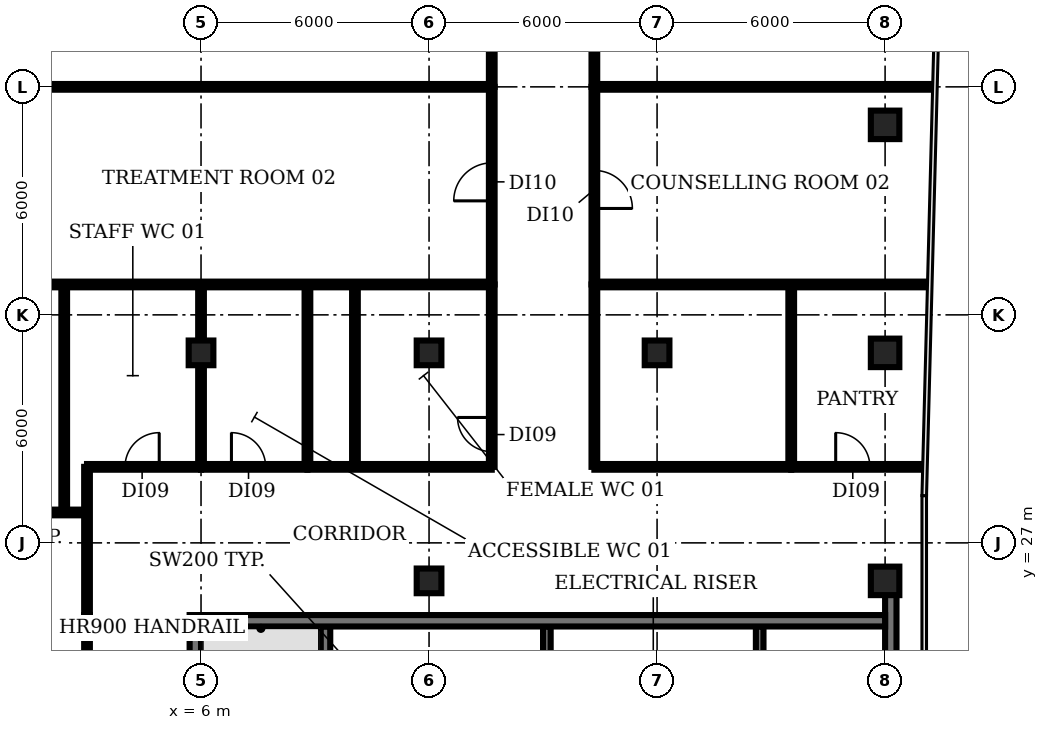
"""IFC4 building model, lengths in metres.
Left out: names, types, materials, properties, quantities, classifications, styles, units other than length and angle.
Written with IfcOpenShell. Run it as: python <this file> out.ifc"""

import sys

from ifc_helpers import new_model, si_unit, direction, frame, frame_2d, origin, origin_2d, place, context, subcontext, project, spatial, rectangle, extrude, element, fill, save


model = new_model("IFC4")
c1 = context("Model", 3, precision=1e-05, world=origin(), true_north=direction((0.0, 1.0)))
c2 = subcontext(c1, "Body", "Model", "MODEL_VIEW")
j1 = project(units=[si_unit("LENGTHUNIT", "METRE"), si_unit("PLANEANGLEUNIT", "RADIAN")], contexts=[c1])
p1 = place(None, origin())
s1 = spatial("IfcSite", under=j1, at=p1, CompositionType="ELEMENT")
p2 = place(p1, origin())
s2 = spatial("IfcBuilding", under=s1, at=p2, CompositionType="ELEMENT")
p3 = place(p2, frame((0.0, 0.0, 281.0)))
s3 = spatial("IfcBuildingStorey", under=s2, at=p3, CompositionType="ELEMENT", Elevation=281.0)
for number, where, z_axis, x_axis in (
    (1, (6.0, 32.0, 0.0), (0.0, 0.0, 1.0), (1.0, 0.0, 0.0)),
    (2, (12.0, 26.0, 0.0), (0.0, 0.0, 1.0), (1.0, 0.0, 0.0)),
    (3, (12.0, 32.0, 0.0), (0.0, 0.0, 1.0), (1.0, 0.0, 0.0)),
    (4, (18.0, 32.0, 0.0), (0.0, 0.0, 1.0), (1.0, 0.0, 0.0)),
):
    element("IfcColumn", number, at=place(p3, frame(where, z_axis=z_axis, x_axis=x_axis)), inside=s3, PredefinedType="COLUMN", context=c2, shape_type="SweptSolid", body=[
        extrude(rectangle(XDim=0.65, YDim=0.65, at=origin_2d()), origin(), (0.0, 0.0, 1.0), 3.85),
    ])
for number, where, z_axis, x_axis in (
    (5, (24.0, 26.0, 0.0), (0.0, 0.0, 1.0), (1.0, 0.0, 0.0)),
    (6, (24.0, 32.0, 0.0), (0.0, 0.0, 1.0), (1.0, 0.0, 0.0)),
    (7, (24.0, 38.0, 0.0), (0.0, 0.0, 1.0), (1.0, 0.0, 0.0)),
):
    element("IfcColumn", number, at=place(p3, frame(where, z_axis=z_axis, x_axis=x_axis)), inside=s3, PredefinedType="COLUMN", context=c2, shape_type="SweptSolid", body=[
        extrude(rectangle(XDim=0.75, YDim=0.75, at=origin_2d()), origin(), (0.0, 0.0, 1.0), 3.85),
    ])
p4 = place(p3, frame((9.275, 18.375, 0.0), z_axis=(0.0, 0.0, 1.0), x_axis=(0.0, 1.0, 0.0)))
e8 = element("IfcWall", 8, at=p4, inside=s3, PredefinedType="SHEAR", context=c2, shape_type="SweptSolid", body=[
    extrude(rectangle(XDim=6.425, YDim=0.25, at=frame_2d((3.212, 0.0))), origin(), (0.0, 0.0, 1.0), 3.85),
])
for number, where, z_axis, x_axis in (
    (9, (15.1, 22.9, 0.0), (0.0, 0.0, 1.0), (0.0, 1.0, 0.0)),
    (10, (20.7, 22.9, 0.0), (0.0, 0.0, 1.0), (0.0, 1.0, 0.0)),
):
    element("IfcWall", number, at=place(p3, frame(where, z_axis=z_axis, x_axis=x_axis)), inside=s3, PredefinedType="SHEAR", context=c2, shape_type="SweptSolid", body=[
        extrude(rectangle(XDim=1.9, YDim=0.2, at=frame_2d((0.95, 0.0))), origin(), (0.0, 0.0, 1.0), 3.85),
    ])
p5 = place(p3, frame((5.85, 5.1, 0.0), z_axis=(0.0, 0.0, 1.0), x_axis=(0.0, 1.0, 0.0)))
e11 = element("IfcWall", 11, at=p5, inside=s3, PredefinedType="SHEAR", context=c2, shape_type="SweptSolid", body=[
    extrude(rectangle(XDim=20.0, YDim=0.3, at=frame_2d((10.0, 0.0))), origin(), (0.0, 0.0, 1.0), 3.85),
])
p6 = place(p5, frame((0.55, 0.0, 0.0)))
e12 = element("IfcOpeningElement", 12, at=p6, cuts=e11, PredefinedType="OPENING", context=c2, shape_type="SweptSolid", body=[
    extrude(rectangle(XDim=1.5, YDim=2.1, at=frame_2d((0.75, 1.05))), frame((0.0, 0.16, 0.0), z_axis=(0.0, -1.0, 0.0), x_axis=(1.0, 0.0, 0.0)), (0.0, 0.0, 1.0), 0.32),
])
p7 = place(p5, frame((7.0, 0.0, 0.0)))
e13 = element("IfcOpeningElement", 13, at=p7, cuts=e11, PredefinedType="OPENING", context=c2, shape_type="SweptSolid", body=[
    extrude(rectangle(XDim=1.2, YDim=2.1, at=frame_2d((0.6, 1.05))), frame((0.0, 0.16, 0.0), z_axis=(0.0, -1.0, 0.0), x_axis=(1.0, 0.0, 0.0)), (0.0, 0.0, 1.0), 0.32),
])
p8 = place(p5, frame((13.55, 0.0, 0.0)))
e14 = element("IfcOpeningElement", 14, at=p8, cuts=e11, PredefinedType="OPENING", context=c2, shape_type="SweptSolid", body=[
    extrude(rectangle(XDim=1.2, YDim=2.1, at=frame_2d((0.6, 1.05))), frame((0.0, 0.16, 0.0), z_axis=(0.0, -1.0, 0.0), x_axis=(1.0, 0.0, 0.0)), (0.0, 0.0, 1.0), 0.32),
])
p9 = place(p3, frame((24.15, 25.655, 0.0), z_axis=(0.0, 0.0, 1.0), x_axis=(0.0, -1.0, 0.0)))
e15 = element("IfcWall", 15, at=p9, inside=s3, PredefinedType="SHEAR", context=c2, shape_type="SweptSolid", body=[
    extrude(rectangle(XDim=20.555, YDim=0.3, at=frame_2d((10.277, 0.0))), origin(), (0.0, 0.0, 1.0), 3.85),
])
p10 = place(p9, frame((18.505, 0.0, 0.0)))
e16 = element("IfcOpeningElement", 16, at=p10, cuts=e15, PredefinedType="OPENING", context=c2, shape_type="SweptSolid", body=[
    extrude(rectangle(XDim=1.5, YDim=2.1, at=frame_2d((0.75, 1.05))), frame((0.0, 0.16, 0.0), z_axis=(0.0, -1.0, 0.0), x_axis=(1.0, 0.0, 0.0)), (0.0, 0.0, 1.0), 0.32),
])
p11 = place(p9, frame((12.405, 0.0, 0.0)))
e17 = element("IfcOpeningElement", 17, at=p11, cuts=e15, PredefinedType="OPENING", context=c2, shape_type="SweptSolid", body=[
    extrude(rectangle(XDim=0.9, YDim=2.1, at=frame_2d((0.45, 1.05))), frame((0.0, 0.16, 0.0), z_axis=(0.0, -1.0, 0.0), x_axis=(1.0, 0.0, 0.0)), (0.0, 0.0, 1.0), 0.32),
])
p12 = place(p9, frame((6.405, 0.0, 0.0)))
e18 = element("IfcOpeningElement", 18, at=p12, cuts=e15, PredefinedType="OPENING", context=c2, shape_type="SweptSolid", body=[
    extrude(rectangle(XDim=2.0, YDim=2.1, at=frame_2d((1.0, 1.05))), frame((0.0, 0.16, 0.0), z_axis=(0.0, -1.0, 0.0), x_axis=(1.0, 0.0, 0.0)), (0.0, 0.0, 1.0), 0.32),
])
p13 = place(p3, frame((6.0, 24.95, 0.0), z_axis=(0.0, 0.0, 1.0), x_axis=(1.0, 0.0, 0.0)))
e19 = element("IfcWall", 19, at=p13, inside=s3, PredefinedType="SHEAR", context=c2, shape_type="SweptSolid", body=[
    extrude(rectangle(XDim=18.0, YDim=0.3, at=frame_2d((9.0, 0.0))), origin(), (0.0, 0.0, 1.0), 3.85),
])
p14 = place(p3, frame((-1.0, 27.8, 0.0), z_axis=(0.0, 0.0, 1.0), x_axis=(1.0, 0.0, 0.0)))
e20 = element("IfcWall", 20, at=p14, inside=s3, PredefinedType="PARTITIONING", context=c2, shape_type="SweptSolid", body=[
    extrude(rectangle(XDim=4.0, YDim=0.15, at=frame_2d((2.0, 0.0))), origin(), (0.0, 0.0, 1.0), 2.9),
])
for number, where, z_axis, x_axis in (
    (21, (-0.98, 33.8, 0.0), (0.0, 0.0, 1.0), (1.0, 0.0, 0.0)),
    (22, (-0.98, 39.0, 0.0), (0.0, 0.0, 1.0), (1.0, 0.0, 0.0)),
):
    element("IfcWall", number, at=place(p3, frame(where, z_axis=z_axis, x_axis=x_axis)), inside=s3, PredefinedType="PARTITIONING", context=c2, shape_type="SweptSolid", body=[
        extrude(rectangle(XDim=14.63, YDim=0.15, at=frame_2d((7.315, 0.0))), origin(), (0.0, 0.0, 1.0), 2.9),
    ])
p15 = place(p3, frame((2.4, 27.8, 0.0), z_axis=(0.0, 0.0, 1.0), x_axis=(0.0, 1.0, 0.0)))
e23 = element("IfcWall", 23, at=p15, inside=s3, PredefinedType="PARTITIONING", context=c2, shape_type="SweptSolid", body=[
    extrude(rectangle(XDim=6.0, YDim=0.15, at=frame_2d((3.0, 0.0))), origin(), (0.0, 0.0, 1.0), 2.9),
])
p16 = place(p3, frame((3.0, 5.1, 0.0), z_axis=(0.0, 0.0, 1.0), x_axis=(0.0, 1.0, 0.0)))
e24 = element("IfcWall", 24, at=p16, inside=s3, PredefinedType="PARTITIONING", context=c2, shape_type="SweptSolid", body=[
    extrude(rectangle(XDim=20.0, YDim=0.15, at=frame_2d((10.0, 0.0))), origin(), (0.0, 0.0, 1.0), 2.9),
])
p17 = place(p16, frame((9.3, 0.0, 0.0)))
e25 = element("IfcOpeningElement", 25, at=p17, cuts=e24, PredefinedType="OPENING", context=c2, shape_type="SweptSolid", body=[
    extrude(rectangle(XDim=1.2, YDim=2.1, at=frame_2d((0.6, 1.05))), frame((0.0, 0.085, 0.0), z_axis=(0.0, -1.0, 0.0), x_axis=(1.0, 0.0, 0.0)), (0.0, 0.0, 1.0), 0.17),
])
p18 = place(p3, frame((3.0, 25.1, 0.0), z_axis=(0.0, 0.0, 1.0), x_axis=(0.0, 1.0, 0.0)))
e26 = element("IfcWall", 26, at=p18, inside=s3, PredefinedType="PARTITIONING", context=c2, shape_type="SweptSolid", body=[
    extrude(rectangle(XDim=3.9, YDim=0.15, at=frame_2d((1.95, 0.0))), origin(), (0.0, 0.0, 1.0), 2.9),
])
p19 = place(p3, frame((3.0, 29.0, 0.0), z_axis=(0.0, 0.0, 1.0), x_axis=(1.0, 0.0, 0.0)))
e27 = element("IfcWall", 27, at=p19, inside=s3, PredefinedType="PARTITIONING", context=c2, shape_type="SweptSolid", body=[
    extrude(rectangle(XDim=3.0, YDim=0.15, at=frame_2d((1.5, 0.0))), origin(), (0.0, 0.0, 1.0), 2.9),
])
p20 = place(p19, frame((1.0, 0.0, 0.0)))
e28 = element("IfcOpeningElement", 28, at=p20, cuts=e27, PredefinedType="OPENING", context=c2, shape_type="SweptSolid", body=[
    extrude(rectangle(XDim=0.9, YDim=2.1, at=frame_2d((0.45, 1.05))), frame((0.0, 0.085, 0.0), z_axis=(0.0, -1.0, 0.0), x_axis=(1.0, 0.0, 0.0)), (0.0, 0.0, 1.0), 0.17),
])
p21 = place(p3, frame((6.0, 29.0, 0.0), z_axis=(0.0, 0.0, 1.0), x_axis=(0.0, 1.0, 0.0)))
e29 = element("IfcWall", 29, at=p21, inside=s3, PredefinedType="PARTITIONING", context=c2, shape_type="SweptSolid", body=[
    extrude(rectangle(XDim=4.8, YDim=0.15, at=frame_2d((2.4, 0.0))), origin(), (0.0, 0.0, 1.0), 2.9),
])
p22 = place(p3, frame((6.0, 29.0, 0.0), z_axis=(0.0, 0.0, 1.0), x_axis=(1.0, 0.0, 0.0)))
e30 = element("IfcWall", 30, at=p22, inside=s3, PredefinedType="PARTITIONING", context=c2, shape_type="SweptSolid", body=[
    extrude(rectangle(XDim=2.8, YDim=0.15, at=frame_2d((1.4, 0.0))), origin(), (0.0, 0.0, 1.0), 2.9),
])
p23 = place(p22, frame((0.8, 0.0, 0.0)))
e31 = element("IfcOpeningElement", 31, at=p23, cuts=e30, PredefinedType="OPENING", context=c2, shape_type="SweptSolid", body=[
    extrude(rectangle(XDim=0.9, YDim=2.1, at=frame_2d((0.45, 1.05))), frame((0.0, 0.085, 0.0), z_axis=(0.0, -1.0, 0.0), x_axis=(1.0, 0.0, 0.0)), (0.0, 0.0, 1.0), 0.17),
])
p24 = place(p3, frame((8.8, 29.0, 0.0), z_axis=(0.0, 0.0, 1.0), x_axis=(0.0, 1.0, 0.0)))
e32 = element("IfcWall", 32, at=p24, inside=s3, PredefinedType="PARTITIONING", context=c2, shape_type="SweptSolid", body=[
    extrude(rectangle(XDim=4.8, YDim=0.15, at=frame_2d((2.4, 0.0))), origin(), (0.0, 0.0, 1.0), 2.9),
])
p25 = place(p3, frame((8.8, 29.0, 0.0), z_axis=(0.0, 0.0, 1.0), x_axis=(1.0, 0.0, 0.0)))
e33 = element("IfcWall", 33, at=p25, inside=s3, PredefinedType="PARTITIONING", context=c2, shape_type="SweptSolid", body=[
    extrude(rectangle(XDim=4.85, YDim=0.15, at=frame_2d((2.425, 0.0))), origin(), (0.0, 0.0, 1.0), 2.9),
])
p26 = place(p3, frame((10.05, 29.0, 0.0), z_axis=(0.0, 0.0, 1.0), x_axis=(0.0, 1.0, 0.0)))
e34 = element("IfcWall", 34, at=p26, inside=s3, PredefinedType="PARTITIONING", context=c2, shape_type="SweptSolid", body=[
    extrude(rectangle(XDim=4.8, YDim=0.15, at=frame_2d((2.4, 0.0))), origin(), (0.0, 0.0, 1.0), 2.9),
])
p27 = place(p3, frame((13.65, 29.0, 0.0), z_axis=(0.0, 0.0, 1.0), x_axis=(0.0, 1.0, 0.0)))
e35 = element("IfcWall", 35, at=p27, inside=s3, PredefinedType="PARTITIONING", context=c2, shape_type="SweptSolid", body=[
    extrude(rectangle(XDim=4.8, YDim=0.15, at=frame_2d((2.4, 0.0))), origin(), (0.0, 0.0, 1.0), 2.9),
])
p28 = place(p27, frame((0.4, 0.0, 0.0)))
e36 = element("IfcOpeningElement", 36, at=p28, cuts=e35, PredefinedType="OPENING", context=c2, shape_type="SweptSolid", body=[
    extrude(rectangle(XDim=0.9, YDim=2.1, at=frame_2d((0.45, 1.05))), frame((0.0, 0.085, 0.0), z_axis=(0.0, -1.0, 0.0), x_axis=(1.0, 0.0, 0.0)), (0.0, 0.0, 1.0), 0.17),
])
p29 = place(p3, frame((13.65, 33.8, 0.0), z_axis=(0.0, 0.0, 1.0), x_axis=(0.0, 1.0, 0.0)))
e37 = element("IfcWall", 37, at=p29, inside=s3, PredefinedType="PARTITIONING", context=c2, shape_type="SweptSolid", body=[
    extrude(rectangle(XDim=5.2, YDim=0.15, at=frame_2d((2.6, 0.0))), origin(), (0.0, 0.0, 1.0), 2.9),
])
p30 = place(p29, frame((2.2, 0.0, 0.0)))
e38 = element("IfcOpeningElement", 38, at=p30, cuts=e37, PredefinedType="OPENING", context=c2, shape_type="SweptSolid", body=[
    extrude(rectangle(XDim=1.0, YDim=2.1, at=frame_2d((0.5, 1.05))), frame((0.0, 0.085, 0.0), z_axis=(0.0, -1.0, 0.0), x_axis=(1.0, 0.0, 0.0)), (0.0, 0.0, 1.0), 0.17),
])
p31 = place(p3, frame((13.65, 39.0, 0.0), z_axis=(0.0, 0.0, 1.0), x_axis=(0.0, 1.0, 0.0)))
e39 = element("IfcWall", 39, at=p31, inside=s3, PredefinedType="PARTITIONING", context=c2, shape_type="SweptSolid", body=[
    extrude(rectangle(XDim=6.0, YDim=0.15, at=frame_2d((3.0, 0.0))), origin(), (0.0, 0.0, 1.0), 2.9),
])
p32 = place(p31, frame((2.4, 0.0, 0.0)))
e40 = element("IfcOpeningElement", 40, at=p32, cuts=e39, PredefinedType="OPENING", context=c2, shape_type="SweptSolid", body=[
    extrude(rectangle(XDim=1.0, YDim=2.1, at=frame_2d((0.5, 1.05))), frame((0.0, 0.085, 0.0), z_axis=(0.0, -1.0, 0.0), x_axis=(1.0, 0.0, 0.0)), (0.0, 0.0, 1.0), 0.17),
])
p33 = place(p3, frame((16.35, 29.0, 0.0), z_axis=(0.0, 0.0, 1.0), x_axis=(0.0, 1.0, 0.0)))
e41 = element("IfcWall", 41, at=p33, inside=s3, PredefinedType="PARTITIONING", context=c2, shape_type="SweptSolid", body=[
    extrude(rectangle(XDim=4.8, YDim=0.15, at=frame_2d((2.4, 0.0))), origin(), (0.0, 0.0, 1.0), 2.9),
])
p34 = place(p3, frame((16.35, 29.0, 0.0), z_axis=(0.0, 0.0, 1.0), x_axis=(1.0, 0.0, 0.0)))
e42 = element("IfcWall", 42, at=p34, inside=s3, PredefinedType="PARTITIONING", context=c2, shape_type="SweptSolid", body=[
    extrude(rectangle(XDim=5.18, YDim=0.15, at=frame_2d((2.59, 0.0))), origin(), (0.0, 0.0, 1.0), 2.9),
])
p35 = place(p3, frame((16.35, 33.8, 0.0), z_axis=(0.0, 0.0, 1.0), x_axis=(1.0, 0.0, 0.0)))
e43 = element("IfcWall", 43, at=p35, inside=s3, PredefinedType="PARTITIONING", context=c2, shape_type="SweptSolid", body=[
    extrude(rectangle(XDim=8.78, YDim=0.15, at=frame_2d((4.39, 0.0))), origin(), (0.0, 0.0, 1.0), 2.9),
])
p36 = place(p3, frame((16.35, 39.0, 0.0), z_axis=(0.0, 0.0, 1.0), x_axis=(0.0, -1.0, 0.0)))
e44 = element("IfcWall", 44, at=p36, inside=s3, PredefinedType="PARTITIONING", context=c2, shape_type="SweptSolid", body=[
    extrude(rectangle(XDim=5.2, YDim=0.15, at=frame_2d((2.6, 0.0))), origin(), (0.0, 0.0, 1.0), 2.9),
])
p37 = place(p36, frame((2.2, 0.0, 0.0)))
e45 = element("IfcOpeningElement", 45, at=p37, cuts=e44, PredefinedType="OPENING", context=c2, shape_type="SweptSolid", body=[
    extrude(rectangle(XDim=1.0, YDim=2.1, at=frame_2d((0.5, 1.05))), frame((0.0, 0.085, 0.0), z_axis=(0.0, -1.0, 0.0), x_axis=(1.0, 0.0, 0.0)), (0.0, 0.0, 1.0), 0.17),
])
p38 = place(p3, frame((16.35, 39.0, 0.0), z_axis=(0.0, 0.0, 1.0), x_axis=(1.0, 0.0, 0.0)))
e46 = element("IfcWall", 46, at=p38, inside=s3, PredefinedType="PARTITIONING", context=c2, shape_type="SweptSolid", body=[
    extrude(rectangle(XDim=8.91, YDim=0.15, at=frame_2d((4.455, 0.0))), origin(), (0.0, 0.0, 1.0), 2.9),
])
p39 = place(p3, frame((16.35, 57.0, 0.0), z_axis=(0.0, 0.0, 1.0), x_axis=(0.0, -1.0, 0.0)))
e47 = element("IfcWall", 47, at=p39, inside=s3, PredefinedType="PARTITIONING", context=c2, shape_type="SweptSolid", body=[
    extrude(rectangle(XDim=18.0, YDim=0.15, at=frame_2d((9.0, 0.0))), origin(), (0.0, 0.0, 1.0), 2.9),
])
p40 = place(p39, frame((8.5, 0.0, 0.0)))
e48 = element("IfcOpeningElement", 48, at=p40, cuts=e47, PredefinedType="OPENING", context=c2, shape_type="SweptSolid", body=[
    extrude(rectangle(XDim=1.2, YDim=2.1, at=frame_2d((0.6, 1.05))), frame((0.0, 0.085, 0.0), z_axis=(0.0, -1.0, 0.0), x_axis=(1.0, 0.0, 0.0)), (0.0, 0.0, 1.0), 0.17),
])
p41 = place(p3, frame((21.53, 29.0, 0.0), z_axis=(0.0, 0.0, 1.0), x_axis=(0.0, 1.0, 0.0)))
e49 = element("IfcWall", 49, at=p41, inside=s3, PredefinedType="PARTITIONING", context=c2, shape_type="SweptSolid", body=[
    extrude(rectangle(XDim=4.8, YDim=0.15, at=frame_2d((2.4, 0.0))), origin(), (0.0, 0.0, 1.0), 2.9),
])
p42 = place(p3, frame((21.53, 29.0, 0.0), z_axis=(0.0, 0.0, 1.0), x_axis=(1.0, 0.0, 0.0)))
e50 = element("IfcWall", 50, at=p42, inside=s3, PredefinedType="PARTITIONING", context=c2, shape_type="SweptSolid", body=[
    extrude(rectangle(XDim=3.47, YDim=0.15, at=frame_2d((1.735, 0.0))), origin(), (0.0, 0.0, 1.0), 2.9),
])
p43 = place(p42, frame((1.17, 0.0, 0.0)))
e51 = element("IfcOpeningElement", 51, at=p43, cuts=e50, PredefinedType="OPENING", context=c2, shape_type="SweptSolid", body=[
    extrude(rectangle(XDim=0.9, YDim=2.1, at=frame_2d((0.45, 1.05))), frame((0.0, 0.085, 0.0), z_axis=(0.0, -1.0, 0.0), x_axis=(1.0, 0.0, 0.0)), (0.0, 0.0, 1.0), 0.17),
])
p44 = place(p20, origin())
e52 = element("IfcDoor", 52, at=p44, inside=s3, OperationType="SINGLE_SWING_RIGHT", PredefinedType="DOOR", context=c2, shape_type="SweptSolid", body=[
    extrude(rectangle(XDim=0.9, YDim=2.1, at=frame_2d((0.45, 1.05))), frame((0.0, 0.025, 0.0), z_axis=(0.0, -1.0, 0.0), x_axis=(1.0, 0.0, 0.0)), (0.0, 0.0, 1.0), 0.05),
])
fill(e28, e52)
p45 = place(p23, origin())
e53 = element("IfcDoor", 53, at=p45, inside=s3, OperationType="SINGLE_SWING_LEFT", PredefinedType="DOOR", context=c2, shape_type="SweptSolid", body=[
    extrude(rectangle(XDim=0.9, YDim=2.1, at=frame_2d((0.45, 1.05))), frame((0.0, 0.025, 0.0), z_axis=(0.0, -1.0, 0.0), x_axis=(1.0, 0.0, 0.0)), (0.0, 0.0, 1.0), 0.05),
])
fill(e31, e53)
p46 = place(p28, origin())
e54 = element("IfcDoor", 54, at=p46, inside=s3, OperationType="SINGLE_SWING_RIGHT", PredefinedType="DOOR", context=c2, shape_type="SweptSolid", body=[
    extrude(rectangle(XDim=0.9, YDim=2.1, at=frame_2d((0.45, 1.05))), frame((0.0, 0.025, 0.0), z_axis=(0.0, -1.0, 0.0), x_axis=(1.0, 0.0, 0.0)), (0.0, 0.0, 1.0), 0.05),
])
fill(e36, e54)
p47 = place(p30, origin())
e55 = element("IfcDoor", 55, at=p47, inside=s3, OperationType="SINGLE_SWING_LEFT", PredefinedType="DOOR", context=c2, shape_type="SweptSolid", body=[
    extrude(rectangle(XDim=1.0, YDim=2.1, at=frame_2d((0.5, 1.05))), frame((0.0, 0.025, 0.0), z_axis=(0.0, -1.0, 0.0), x_axis=(1.0, 0.0, 0.0)), (0.0, 0.0, 1.0), 0.05),
])
fill(e38, e55)
p48 = place(p37, origin())
e56 = element("IfcDoor", 56, at=p48, inside=s3, OperationType="SINGLE_SWING_RIGHT", PredefinedType="DOOR", context=c2, shape_type="SweptSolid", body=[
    extrude(rectangle(XDim=1.0, YDim=2.1, at=frame_2d((0.5, 1.05))), frame((0.0, 0.025, 0.0), z_axis=(0.0, -1.0, 0.0), x_axis=(1.0, 0.0, 0.0)), (0.0, 0.0, 1.0), 0.05),
])
fill(e45, e56)
p49 = place(p43, origin())
e57 = element("IfcDoor", 57, at=p49, inside=s3, OperationType="SINGLE_SWING_LEFT", PredefinedType="DOOR", context=c2, shape_type="SweptSolid", body=[
    extrude(rectangle(XDim=0.9, YDim=2.1, at=frame_2d((0.45, 1.05))), frame((0.0, 0.025, 0.0), z_axis=(0.0, -1.0, 0.0), x_axis=(1.0, 0.0, 0.0)), (0.0, 0.0, 1.0), 0.05),
])
fill(e51, e57)
save(model, sys.argv[1])
